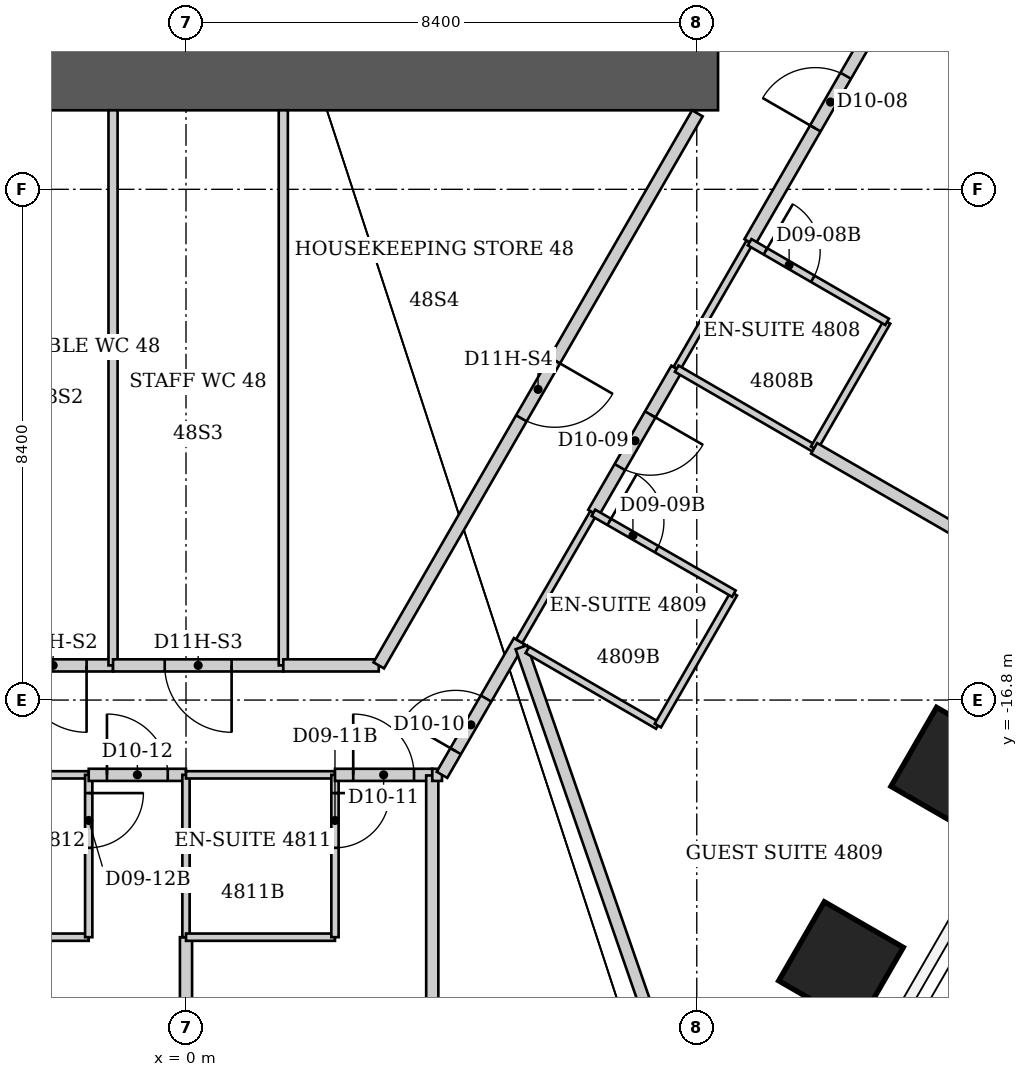
"""IFC4 building model, lengths in metres.
Left out: names, types, materials, properties, quantities, classifications, styles, units other than length and angle.
Written with IfcOpenShell. Run it as: python <this file> out.ifc"""

import sys

from ifc_helpers import new_model, si_unit, direction, frame, frame_2d, origin, origin_2d, place, context, subcontext, project, spatial, rectangle, extrude, element, fill, save


model = new_model("IFC4")
c1 = context("Model", 3, precision=1e-05, world=origin(), true_north=direction((0.0, 1.0)))
c2 = subcontext(c1, "Body", "Model", "MODEL_VIEW")
j1 = project(units=[si_unit("LENGTHUNIT", "METRE"), si_unit("PLANEANGLEUNIT", "RADIAN")], contexts=[c1])
p1 = place(None, origin())
s1 = spatial("IfcSite", under=j1, at=p1, CompositionType="ELEMENT")
p2 = place(p1, origin())
s2 = spatial("IfcBuilding", under=s1, at=p2, CompositionType="ELEMENT")
p3 = place(p2, frame((0.0, 0.0, 194.6)))
s3 = spatial("IfcBuildingStorey", under=s2, at=p3, CompositionType="ELEMENT", Elevation=194.6)
for number, where, z_axis, x_axis in (
    (1, (12.618, -17.945, 0.0), (0.0, 0.0, 1.0), (0.866, -0.5, 0.0)),
    (2, (10.772, -21.142, 0.0), (0.0, 0.0, 1.0), (0.866, -0.5, 0.0)),
):
    element("IfcColumn", number, at=place(p3, frame(where, z_axis=z_axis, x_axis=x_axis)), inside=s3, PredefinedType="COLUMN", context=c2, shape_type="SweptSolid", body=[
        extrude(rectangle(XDim=1.5, YDim=1.5, at=origin_2d()), origin(), (0.0, 0.0, 1.0), 3.8),
    ])
p4 = place(p3, frame((-8.75, -6.6, 0.0), z_axis=(0.0, 0.0, 1.0), x_axis=(1.0, 0.0, 0.0)))
e3 = element("IfcWall", 3, at=p4, inside=s3, PredefinedType="SHEAR", context=c2, shape_type="SweptSolid", body=[
    extrude(rectangle(XDim=17.5, YDim=1.0, at=frame_2d((8.75, 0.0))), origin(), (0.0, 0.0, 1.0), 3.8),
])
for number, where, z_axis, x_axis in (
    (4, (-4.05, -20.7, 0.0), (0.0, 0.0, 1.0), (1.0, 0.0, 0.0)),
    (5, (-4.05, -18.03, 0.0), (0.0, 0.0, 1.0), (1.0, 0.0, 0.0)),
):
    element("IfcWall", number, at=place(p3, frame(where, z_axis=z_axis, x_axis=x_axis)), inside=s3, PredefinedType="PARTITIONING", context=c2, shape_type="SweptSolid", body=[
        extrude(rectangle(XDim=2.45, YDim=0.12, at=frame_2d((1.225, 0.0))), origin(), (0.0, 0.0, 1.0), 3.64),
    ])
p5 = place(p3, frame((-1.6, -20.7, 0.0), z_axis=(0.0, 0.0, 1.0), x_axis=(0.0, 1.0, 0.0)))
e6 = element("IfcWall", 6, at=p5, inside=s3, PredefinedType="PARTITIONING", context=c2, shape_type="SweptSolid", body=[
    extrude(rectangle(XDim=2.67, YDim=0.12, at=frame_2d((1.335, 0.0))), origin(), (0.0, 0.0, 1.0), 3.64),
])
p6 = place(p5, frame((1.47, 0.0, 0.0)))
e7 = element("IfcOpeningElement", 7, at=p6, cuts=e6, PredefinedType="OPENING", context=c2, shape_type="SweptSolid", body=[
    extrude(rectangle(XDim=0.9, YDim=2.03, at=frame_2d((0.45, 1.015))), frame((0.0, 0.06, 0.0), z_axis=(0.0, -1.0, 0.0), x_axis=(1.0, 0.0, 0.0)), (0.0, 0.0, 1.0), 0.12),
])
p7 = place(p3, frame((-1.6, -18.03, 0.0), z_axis=(0.0, 0.0, 1.0), x_axis=(1.0, 0.0, 0.0)))
e8 = element("IfcWall", 8, at=p7, inside=s3, PredefinedType="PARTITIONING", context=c2, shape_type="SweptSolid", body=[
    extrude(rectangle(XDim=1.6, YDim=0.2, at=frame_2d((0.8, 0.0))), origin(), (0.0, 0.0, 1.0), 3.64),
])
p8 = place(p7, frame((0.3, 0.0, 0.0)))
e9 = element("IfcOpeningElement", 9, at=p8, cuts=e8, PredefinedType="OPENING", context=c2, shape_type="SweptSolid", body=[
    extrude(rectangle(XDim=1.0, YDim=2.13, at=frame_2d((0.5, 1.065))), frame((0.0, 0.1, 0.0), z_axis=(0.0, -1.0, 0.0), x_axis=(1.0, 0.0, 0.0)), (0.0, 0.0, 1.0), 0.2),
])
p9 = place(p3, frame((-1.2, -16.23, 0.0), z_axis=(0.0, 0.0, 1.0), x_axis=(-1.0, 0.0, 0.0)))
e10 = element("IfcWall", 10, at=p9, inside=s3, PredefinedType="PARTITIONING", context=c2, shape_type="SweptSolid", body=[
    extrude(rectangle(XDim=1.97, YDim=0.2, at=frame_2d((0.985, 0.0))), origin(), (0.0, 0.0, 1.0), 3.64),
])
p10 = place(p9, frame((0.435, 0.0, 0.0)))
e11 = element("IfcOpeningElement", 11, at=p10, cuts=e10, PredefinedType="OPENING", context=c2, shape_type="SweptSolid", body=[
    extrude(rectangle(XDim=1.1, YDim=2.2, at=frame_2d((0.55, 1.1))), frame((0.0, 0.1, 0.0), z_axis=(0.0, -1.0, 0.0), x_axis=(1.0, 0.0, 0.0)), (0.0, 0.0, 1.0), 0.2),
])
p11 = place(p3, frame((-1.2, -7.1, 0.0), z_axis=(0.0, 0.0, 1.0), x_axis=(0.0, -1.0, 0.0)))
e12 = element("IfcWall", 12, at=p11, inside=s3, PredefinedType="PARTITIONING", context=c2, shape_type="SweptSolid", body=[
    extrude(rectangle(XDim=9.13, YDim=0.15, at=frame_2d((4.565, 0.0))), origin(), (0.0, 0.0, 1.0), 3.64),
])
p12 = place(p3, frame((0.0, -26.41, 0.0), z_axis=(0.0, 0.0, 1.0), x_axis=(0.0, 1.0, 0.0)))
e13 = element("IfcWall", 13, at=p12, inside=s3, PredefinedType="PARTITIONING", context=c2, shape_type="SweptSolid", body=[
    extrude(rectangle(XDim=5.71, YDim=0.2, at=frame_2d((2.855, 0.0))), origin(), (0.0, 0.0, 1.0), 2.726),
])
p13 = place(p3, frame((0.0, -20.7, 0.0), z_axis=(0.0, 0.0, 1.0), x_axis=(0.0, 1.0, 0.0)))
e14 = element("IfcWall", 14, at=p13, inside=s3, PredefinedType="PARTITIONING", context=c2, shape_type="SweptSolid", body=[
    extrude(rectangle(XDim=2.67, YDim=0.12, at=frame_2d((1.335, 0.0))), origin(), (0.0, 0.0, 1.0), 2.726),
])
for number, where, z_axis, x_axis in (
    (15, (0.0, -20.7, 0.0), (0.0, 0.0, 1.0), (1.0, 0.0, 0.0)),
    (16, (0.0, -18.03, 0.0), (0.0, 0.0, 1.0), (1.0, 0.0, 0.0)),
):
    element("IfcWall", number, at=place(p3, frame(where, z_axis=z_axis, x_axis=x_axis)), inside=s3, PredefinedType="PARTITIONING", context=c2, shape_type="SweptSolid", body=[
        extrude(rectangle(XDim=2.45, YDim=0.12, at=frame_2d((1.225, 0.0))), origin(), (0.0, 0.0, 1.0), 3.64),
    ])
p14 = place(p3, frame((1.6, -16.23, 0.0), z_axis=(0.0, 0.0, 1.0), x_axis=(-1.0, 0.0, 0.0)))
e17 = element("IfcWall", 17, at=p14, inside=s3, PredefinedType="PARTITIONING", context=c2, shape_type="SweptSolid", body=[
    extrude(rectangle(XDim=2.8, YDim=0.2, at=frame_2d((1.4, 0.0))), origin(), (0.0, 0.0, 1.0), 3.64),
])
p15 = place(p14, frame((0.85, 0.0, 0.0)))
e18 = element("IfcOpeningElement", 18, at=p15, cuts=e17, PredefinedType="OPENING", context=c2, shape_type="SweptSolid", body=[
    extrude(rectangle(XDim=1.1, YDim=2.2, at=frame_2d((0.55, 1.1))), frame((0.0, 0.1, 0.0), z_axis=(0.0, -1.0, 0.0), x_axis=(1.0, 0.0, 0.0)), (0.0, 0.0, 1.0), 0.2),
])
p16 = place(p3, frame((1.6, -7.1, 0.0), z_axis=(0.0, 0.0, 1.0), x_axis=(0.0, -1.0, 0.0)))
e19 = element("IfcWall", 19, at=p16, inside=s3, PredefinedType="PARTITIONING", context=c2, shape_type="SweptSolid", body=[
    extrude(rectangle(XDim=9.13, YDim=0.15, at=frame_2d((4.565, 0.0))), origin(), (0.0, 0.0, 1.0), 3.64),
])
p17 = place(p3, frame((2.45, -20.7, 0.0), z_axis=(0.0, 0.0, 1.0), x_axis=(0.0, 1.0, 0.0)))
e20 = element("IfcWall", 20, at=p17, inside=s3, PredefinedType="PARTITIONING", context=c2, shape_type="SweptSolid", body=[
    extrude(rectangle(XDim=2.67, YDim=0.12, at=frame_2d((1.335, 0.0))), origin(), (0.0, 0.0, 1.0), 3.64),
])
p18 = place(p17, frame((1.47, 0.0, 0.0)))
e21 = element("IfcOpeningElement", 21, at=p18, cuts=e20, PredefinedType="OPENING", context=c2, shape_type="SweptSolid", body=[
    extrude(rectangle(XDim=0.9, YDim=2.03, at=frame_2d((0.45, 1.015))), frame((0.0, 0.06, 0.0), z_axis=(0.0, -1.0, 0.0), x_axis=(1.0, 0.0, 0.0)), (0.0, 0.0, 1.0), 0.12),
])
p19 = place(p3, frame((2.45, -18.03, 0.0), z_axis=(0.0, 0.0, 1.0), x_axis=(1.0, 0.0, 0.0)))
e22 = element("IfcWall", 22, at=p19, inside=s3, PredefinedType="PARTITIONING", context=c2, shape_type="SweptSolid", body=[
    extrude(rectangle(XDim=1.6, YDim=0.2, at=frame_2d((0.8, 0.0))), origin(), (0.0, 0.0, 1.0), 3.64),
])
p20 = place(p19, frame((0.3, 0.0, 0.0)))
e23 = element("IfcOpeningElement", 23, at=p20, cuts=e22, PredefinedType="OPENING", context=c2, shape_type="SweptSolid", body=[
    extrude(rectangle(XDim=1.0, YDim=2.13, at=frame_2d((0.5, 1.065))), frame((0.0, 0.1, 0.0), z_axis=(0.0, -1.0, 0.0), x_axis=(1.0, 0.0, 0.0)), (0.0, 0.0, 1.0), 0.2),
])
p21 = place(p3, frame((3.17, -16.23, 0.0), z_axis=(0.0, 0.0, 1.0), x_axis=(-1.0, 0.0, 0.0)))
e24 = element("IfcWall", 24, at=p21, inside=s3, PredefinedType="PARTITIONING", context=c2, shape_type="SweptSolid", body=[
    extrude(rectangle(XDim=1.57, YDim=0.2, at=frame_2d((0.785, 0.0))), origin(), (0.0, 0.0, 1.0), 3.64),
])
p22 = place(p3, frame((4.05, -21.87, 0.0), z_axis=(0.0, 0.0, 1.0), x_axis=(0.0, 1.0, 0.0)))
e25 = element("IfcWall", 25, at=p22, inside=s3, PredefinedType="PARTITIONING", context=c2, shape_type="SweptSolid", body=[
    extrude(rectangle(XDim=3.83, YDim=0.2, at=frame_2d((1.915, 0.0))), origin(), (0.0, 0.0, 1.0), 3.64),
])
p23 = place(p3, frame((4.05, -18.03, 0.0), z_axis=(0.0, 0.0, 1.0), x_axis=(1.0, 0.0, 0.0)))
e26 = element("IfcWall", 26, at=p23, inside=s3, PredefinedType="PARTITIONING", context=c2, shape_type="SweptSolid", body=[
    extrude(rectangle(XDim=0.16, YDim=0.2, at=frame_2d((0.08, 0.0))), origin(), (0.0, 0.0, 1.0), 3.64),
])
p24 = place(p3, frame((4.21, -18.03, 0.0), z_axis=(0.0, 0.0, 1.0), x_axis=(0.499963722229, 0.866046347752, 0.0)))
e27 = element("IfcWall", 27, at=p24, inside=s3, PredefinedType="PARTITIONING", context=c2, shape_type="SweptSolid", body=[
    extrude(rectangle(XDim=2.54, YDim=0.2, at=frame_2d((1.27, 0.0))), origin(), (0.0, 0.0, 1.0), 3.64),
])
p25 = place(p24, frame((0.45, 0.0, 0.0)))
e28 = element("IfcOpeningElement", 28, at=p25, cuts=e27, PredefinedType="OPENING", context=c2, shape_type="SweptSolid", body=[
    extrude(rectangle(XDim=1.0, YDim=2.13, at=frame_2d((0.5, 1.065))), frame((0.0, 0.1, 0.0), z_axis=(0.0, -1.0, 0.0), x_axis=(1.0, 0.0, 0.0)), (0.0, 0.0, 1.0), 0.2),
])
p26 = place(p3, frame((5.48, -15.83, 0.0), z_axis=(0.0, 0.0, 1.0), x_axis=(0.501028373647, 0.865430857319, 0.0)))
e29 = element("IfcWall", 29, at=p26, inside=s3, PredefinedType="PARTITIONING", context=c2, shape_type="SweptSolid", body=[
    extrude(rectangle(XDim=2.437, YDim=0.12, at=frame_2d((1.219, 0.0))), origin(), (0.0, 0.0, 1.0), 3.64),
])
p27 = place(p3, frame((5.515, -15.932, 0.0), z_axis=(0.0, 0.0, 1.0), x_axis=(0.327594697431, -0.944818349851, 0.0)))
e30 = element("IfcWall", 30, at=p27, inside=s3, PredefinedType="PARTITIONING", context=c2, shape_type="SweptSolid", body=[
    extrude(rectangle(XDim=10.668, YDim=0.2, at=frame_2d((5.334, 0.0))), origin(), (0.0, 0.0, 1.0), 3.64),
])
p28 = place(p3, frame((5.615, -15.975, 0.0), z_axis=(0.0, 0.0, 1.0), x_axis=(0.864873056518, -0.501990633487, 0.0)))
e31 = element("IfcWall", 31, at=p28, inside=s3, PredefinedType="PARTITIONING", context=c2, shape_type="SweptSolid", body=[
    extrude(rectangle(XDim=2.48, YDim=0.12, at=frame_2d((1.24, 0.0))), origin(), (0.0, 0.0, 1.0), 3.038),
])
p29 = place(p3, frame((7.76, -17.22, 0.0), z_axis=(0.0, 0.0, 1.0), x_axis=(0.499159685399, 0.866510016372, 0.0)))
e32 = element("IfcWall", 32, at=p29, inside=s3, PredefinedType="PARTITIONING", context=c2, shape_type="SweptSolid", body=[
    extrude(rectangle(XDim=2.504, YDim=0.12, at=frame_2d((1.252, 0.0))), origin(), (0.0, 0.0, 1.0), 3.64),
])
p30 = place(p3, frame((8.069, -11.349, 0.0), z_axis=(0.0, 0.0, 1.0), x_axis=(-0.499611785355, -0.866249423627, 0.0)))
e33 = element("IfcWall", 33, at=p30, inside=s3, PredefinedType="PARTITIONING", context=c2, shape_type="SweptSolid", body=[
    extrude(rectangle(XDim=2.738, YDim=0.2, at=frame_2d((1.369, 0.0))), origin(), (0.0, 0.0, 1.0), 3.64),
])
p31 = place(p30, frame((0.869, 0.0, 0.0)))
e34 = element("IfcOpeningElement", 34, at=p31, cuts=e33, PredefinedType="OPENING", context=c2, shape_type="SweptSolid", body=[
    extrude(rectangle(XDim=1.0, YDim=2.13, at=frame_2d((0.5, 1.065))), frame((0.0, 0.1, 0.0), z_axis=(0.0, -1.0, 0.0), x_axis=(1.0, 0.0, 0.0)), (0.0, 0.0, 1.0), 0.2),
])
p32 = place(p3, frame((8.07, -11.35, 0.0), z_axis=(0.0, 0.0, 1.0), x_axis=(0.499693115345, 0.866202511239, 0.0)))
e35 = element("IfcWall", 35, at=p32, inside=s3, PredefinedType="PARTITIONING", context=c2, shape_type="SweptSolid", body=[
    extrude(rectangle(XDim=2.401, YDim=0.12, at=frame_2d((1.201, 0.0))), origin(), (0.0, 0.0, 1.0), 3.64),
])
p33 = place(p3, frame((8.07, -11.35, 0.0), z_axis=(0.0, 0.0, 1.0), x_axis=(0.865195830568, -0.501434118073, 0.0)))
e36 = element("IfcWall", 36, at=p33, inside=s3, PredefinedType="PARTITIONING", context=c2, shape_type="SweptSolid", body=[
    extrude(rectangle(XDim=2.612, YDim=0.12, at=frame_2d((1.306, 0.0))), origin(), (0.0, 0.0, 1.0), 3.64),
])
p34 = place(p3, frame((8.41, -7.15, 0.0), z_axis=(0.0, 0.0, 1.0), x_axis=(-0.499828628176, -0.866124322748, 0.0)))
e37 = element("IfcWall", 37, at=p34, inside=s3, PredefinedType="PARTITIONING", context=c2, shape_type="SweptSolid", body=[
    extrude(rectangle(XDim=10.484, YDim=0.2, at=frame_2d((5.242, 0.0))), origin(), (0.0, 0.0, 1.0), 3.64),
])
p35 = place(p34, frame((4.692, 0.0, 0.0)))
e38 = element("IfcOpeningElement", 38, at=p35, cuts=e37, PredefinedType="OPENING", context=c2, shape_type="SweptSolid", body=[
    extrude(rectangle(XDim=1.1, YDim=2.2, at=frame_2d((0.55, 1.1))), frame((0.0, 0.1, 0.0), z_axis=(0.0, -1.0, 0.0), x_axis=(1.0, 0.0, 0.0)), (0.0, 0.0, 1.0), 0.2),
])
p36 = place(p3, frame((9.01, -15.05, 0.0), z_axis=(0.0, 0.0, 1.0), x_axis=(-0.866615255992, 0.498976951453, 0.0)))
e39 = element("IfcWall", 39, at=p36, inside=s3, PredefinedType="PARTITIONING", context=c2, shape_type="SweptSolid", body=[
    extrude(rectangle(XDim=2.666, YDim=0.12, at=frame_2d((1.333, 0.0))), origin(), (0.0, 0.0, 1.0), 3.64),
])
p37 = place(p36, frame((1.466, 0.0, 0.0)))
e40 = element("IfcOpeningElement", 40, at=p37, cuts=e39, PredefinedType="OPENING", context=c2, shape_type="SweptSolid", body=[
    extrude(rectangle(XDim=0.9, YDim=2.03, at=frame_2d((0.45, 1.015))), frame((0.0, 0.06, 0.0), z_axis=(0.0, -1.0, 0.0), x_axis=(1.0, 0.0, 0.0)), (0.0, 0.0, 1.0), 0.12),
])
p38 = place(p3, frame((9.27, -9.27, 0.0), z_axis=(0.0, 0.0, 1.0), x_axis=(0.499755544815, 0.866166494057, 0.0)))
e41 = element("IfcWall", 41, at=p38, inside=s3, PredefinedType="PARTITIONING", context=c2, shape_type="SweptSolid", body=[
    extrude(rectangle(XDim=5.323, YDim=0.2, at=frame_2d((2.661, 0.0))), origin(), (0.0, 0.0, 1.0), 3.64),
])
p39 = place(p38, frame((2.161, 0.0, 0.0)))
e42 = element("IfcOpeningElement", 42, at=p39, cuts=e41, PredefinedType="OPENING", context=c2, shape_type="SweptSolid", body=[
    extrude(rectangle(XDim=1.0, YDim=2.13, at=frame_2d((0.5, 1.065))), frame((0.0, 0.1, 0.0), z_axis=(0.0, -1.0, 0.0), x_axis=(1.0, 0.0, 0.0)), (0.0, 0.0, 1.0), 0.2),
])
p40 = place(p3, frame((10.33, -12.66, 0.0), z_axis=(0.0, 0.0, 1.0), x_axis=(0.499737123639, 0.866177122335, 0.0)))
e43 = element("IfcWall", 43, at=p40, inside=s3, PredefinedType="PARTITIONING", context=c2, shape_type="SweptSolid", body=[
    extrude(rectangle(XDim=2.401, YDim=0.12, at=frame_2d((1.201, 0.0))), origin(), (0.0, 0.0, 1.0), 3.64),
])
p41 = place(p3, frame((10.33, -12.66, 0.0), z_axis=(0.0, 0.0, 1.0), x_axis=(0.866342721203, -0.499449986905, 0.0)))
e44 = element("IfcWall", 44, at=p41, inside=s3, PredefinedType="PARTITIONING", context=c2, shape_type="SweptSolid", body=[
    extrude(rectangle(XDim=5.767, YDim=0.2, at=frame_2d((2.883, 0.0))), origin(), (0.0, 0.0, 1.0), 3.64),
])
p42 = place(p3, frame((11.53, -10.58, 0.0), z_axis=(0.0, 0.0, 1.0), x_axis=(-0.865155281359, 0.50150407689, 0.0)))
e45 = element("IfcWall", 45, at=p42, inside=s3, PredefinedType="PARTITIONING", context=c2, shape_type="SweptSolid", body=[
    extrude(rectangle(XDim=2.612, YDim=0.12, at=frame_2d((1.306, 0.0))), origin(), (0.0, 0.0, 1.0), 3.64),
])
p43 = place(p42, frame((1.412, 0.0, 0.0)))
e46 = element("IfcOpeningElement", 46, at=p43, cuts=e45, PredefinedType="OPENING", context=c2, shape_type="SweptSolid", body=[
    extrude(rectangle(XDim=0.9, YDim=2.03, at=frame_2d((0.45, 1.015))), frame((0.0, 0.06, 0.0), z_axis=(0.0, -1.0, 0.0), x_axis=(1.0, 0.0, 0.0)), (0.0, 0.0, 1.0), 0.12),
])
p44 = place(p39, origin())
e47 = element("IfcDoor", 47, at=p44, inside=s3, OperationType="SINGLE_SWING_LEFT", PredefinedType="DOOR", context=c2, shape_type="SweptSolid", body=[
    extrude(rectangle(XDim=1.0, YDim=2.13, at=frame_2d((0.5, 1.065))), frame((0.0, 0.025, 0.0), z_axis=(0.0, -1.0, 0.0), x_axis=(1.0, 0.0, 0.0)), (0.0, 0.0, 1.0), 0.05),
])
fill(e42, e47)
p45 = place(p43, origin())
e48 = element("IfcDoor", 48, at=p45, inside=s3, OperationType="SINGLE_SWING_RIGHT", PredefinedType="DOOR", context=c2, shape_type="SweptSolid", body=[
    extrude(rectangle(XDim=0.9, YDim=2.03, at=frame_2d((0.45, 1.015))), frame((0.0, 0.025, 0.0), z_axis=(0.0, -1.0, 0.0), x_axis=(1.0, 0.0, 0.0)), (0.0, 0.0, 1.0), 0.05),
])
fill(e46, e48)
p46 = place(p31, origin())
e49 = element("IfcDoor", 49, at=p46, inside=s3, OperationType="SINGLE_SWING_LEFT", PredefinedType="DOOR", context=c2, shape_type="SweptSolid", body=[
    extrude(rectangle(XDim=1.0, YDim=2.13, at=frame_2d((0.5, 1.065))), frame((0.0, 0.025, 0.0), z_axis=(0.0, -1.0, 0.0), x_axis=(1.0, 0.0, 0.0)), (0.0, 0.0, 1.0), 0.05),
])
fill(e34, e49)
p47 = place(p37, origin())
e50 = element("IfcDoor", 50, at=p47, inside=s3, OperationType="SINGLE_SWING_RIGHT", PredefinedType="DOOR", context=c2, shape_type="SweptSolid", body=[
    extrude(rectangle(XDim=0.9, YDim=2.03, at=frame_2d((0.45, 1.015))), frame((0.0, 0.025, 0.0), z_axis=(0.0, -1.0, 0.0), x_axis=(1.0, 0.0, 0.0)), (0.0, 0.0, 1.0), 0.05),
])
fill(e40, e50)
p48 = place(p25, origin())
e51 = element("IfcDoor", 51, at=p48, inside=s3, OperationType="SINGLE_SWING_LEFT", PredefinedType="DOOR", context=c2, shape_type="SweptSolid", body=[
    extrude(rectangle(XDim=1.0, YDim=2.13, at=frame_2d((0.5, 1.065))), frame((0.0, 0.025, 0.0), z_axis=(0.0, -1.0, 0.0), x_axis=(1.0, 0.0, 0.0)), (0.0, 0.0, 1.0), 0.05),
])
fill(e28, e51)
p49 = place(p20, origin())
e52 = element("IfcDoor", 52, at=p49, inside=s3, OperationType="SINGLE_SWING_LEFT", PredefinedType="DOOR", context=c2, shape_type="SweptSolid", body=[
    extrude(rectangle(XDim=1.0, YDim=2.13, at=frame_2d((0.5, 1.065))), frame((0.0, 0.025, 0.0), z_axis=(0.0, -1.0, 0.0), x_axis=(1.0, 0.0, 0.0)), (0.0, 0.0, 1.0), 0.05),
])
fill(e23, e52)
p50 = place(p18, origin())
e53 = element("IfcDoor", 53, at=p50, inside=s3, OperationType="SINGLE_SWING_RIGHT", PredefinedType="DOOR", context=c2, shape_type="SweptSolid", body=[
    extrude(rectangle(XDim=0.9, YDim=2.03, at=frame_2d((0.45, 1.015))), frame((0.0, 0.025, 0.0), z_axis=(0.0, -1.0, 0.0), x_axis=(1.0, 0.0, 0.0)), (0.0, 0.0, 1.0), 0.05),
])
fill(e21, e53)
p51 = place(p8, origin())
e54 = element("IfcDoor", 54, at=p51, inside=s3, OperationType="SINGLE_SWING_LEFT", PredefinedType="DOOR", context=c2, shape_type="SweptSolid", body=[
    extrude(rectangle(XDim=1.0, YDim=2.13, at=frame_2d((0.5, 1.065))), frame((0.0, 0.025, 0.0), z_axis=(0.0, -1.0, 0.0), x_axis=(1.0, 0.0, 0.0)), (0.0, 0.0, 1.0), 0.05),
])
fill(e9, e54)
p52 = place(p6, origin())
e55 = element("IfcDoor", 55, at=p52, inside=s3, OperationType="SINGLE_SWING_RIGHT", PredefinedType="DOOR", context=c2, shape_type="SweptSolid", body=[
    extrude(rectangle(XDim=0.9, YDim=2.03, at=frame_2d((0.45, 1.015))), frame((0.0, 0.025, 0.0), z_axis=(0.0, -1.0, 0.0), x_axis=(1.0, 0.0, 0.0)), (0.0, 0.0, 1.0), 0.05),
])
fill(e7, e55)
p53 = place(p10, origin())
e56 = element("IfcDoor", 56, at=p53, inside=s3, OperationType="SINGLE_SWING_LEFT", PredefinedType="DOOR", context=c2, shape_type="SweptSolid", body=[
    extrude(rectangle(XDim=1.1, YDim=2.2, at=frame_2d((0.55, 1.1))), frame((0.0, 0.025, 0.0), z_axis=(0.0, -1.0, 0.0), x_axis=(1.0, 0.0, 0.0)), (0.0, 0.0, 1.0), 0.05),
])
fill(e11, e56)
p54 = place(p15, origin())
e57 = element("IfcDoor", 57, at=p54, inside=s3, OperationType="SINGLE_SWING_LEFT", PredefinedType="DOOR", context=c2, shape_type="SweptSolid", body=[
    extrude(rectangle(XDim=1.1, YDim=2.2, at=frame_2d((0.55, 1.1))), frame((0.0, 0.025, 0.0), z_axis=(0.0, -1.0, 0.0), x_axis=(1.0, 0.0, 0.0)), (0.0, 0.0, 1.0), 0.05),
])
fill(e18, e57)
p55 = place(p35, origin())
e58 = element("IfcDoor", 58, at=p55, inside=s3, OperationType="SINGLE_SWING_LEFT", PredefinedType="DOOR", context=c2, shape_type="SweptSolid", body=[
    extrude(rectangle(XDim=1.1, YDim=2.2, at=frame_2d((0.55, 1.1))), frame((0.0, 0.025, 0.0), z_axis=(0.0, -1.0, 0.0), x_axis=(1.0, 0.0, 0.0)), (0.0, 0.0, 1.0), 0.05),
])
fill(e38, e58)
save(model, sys.argv[1])
